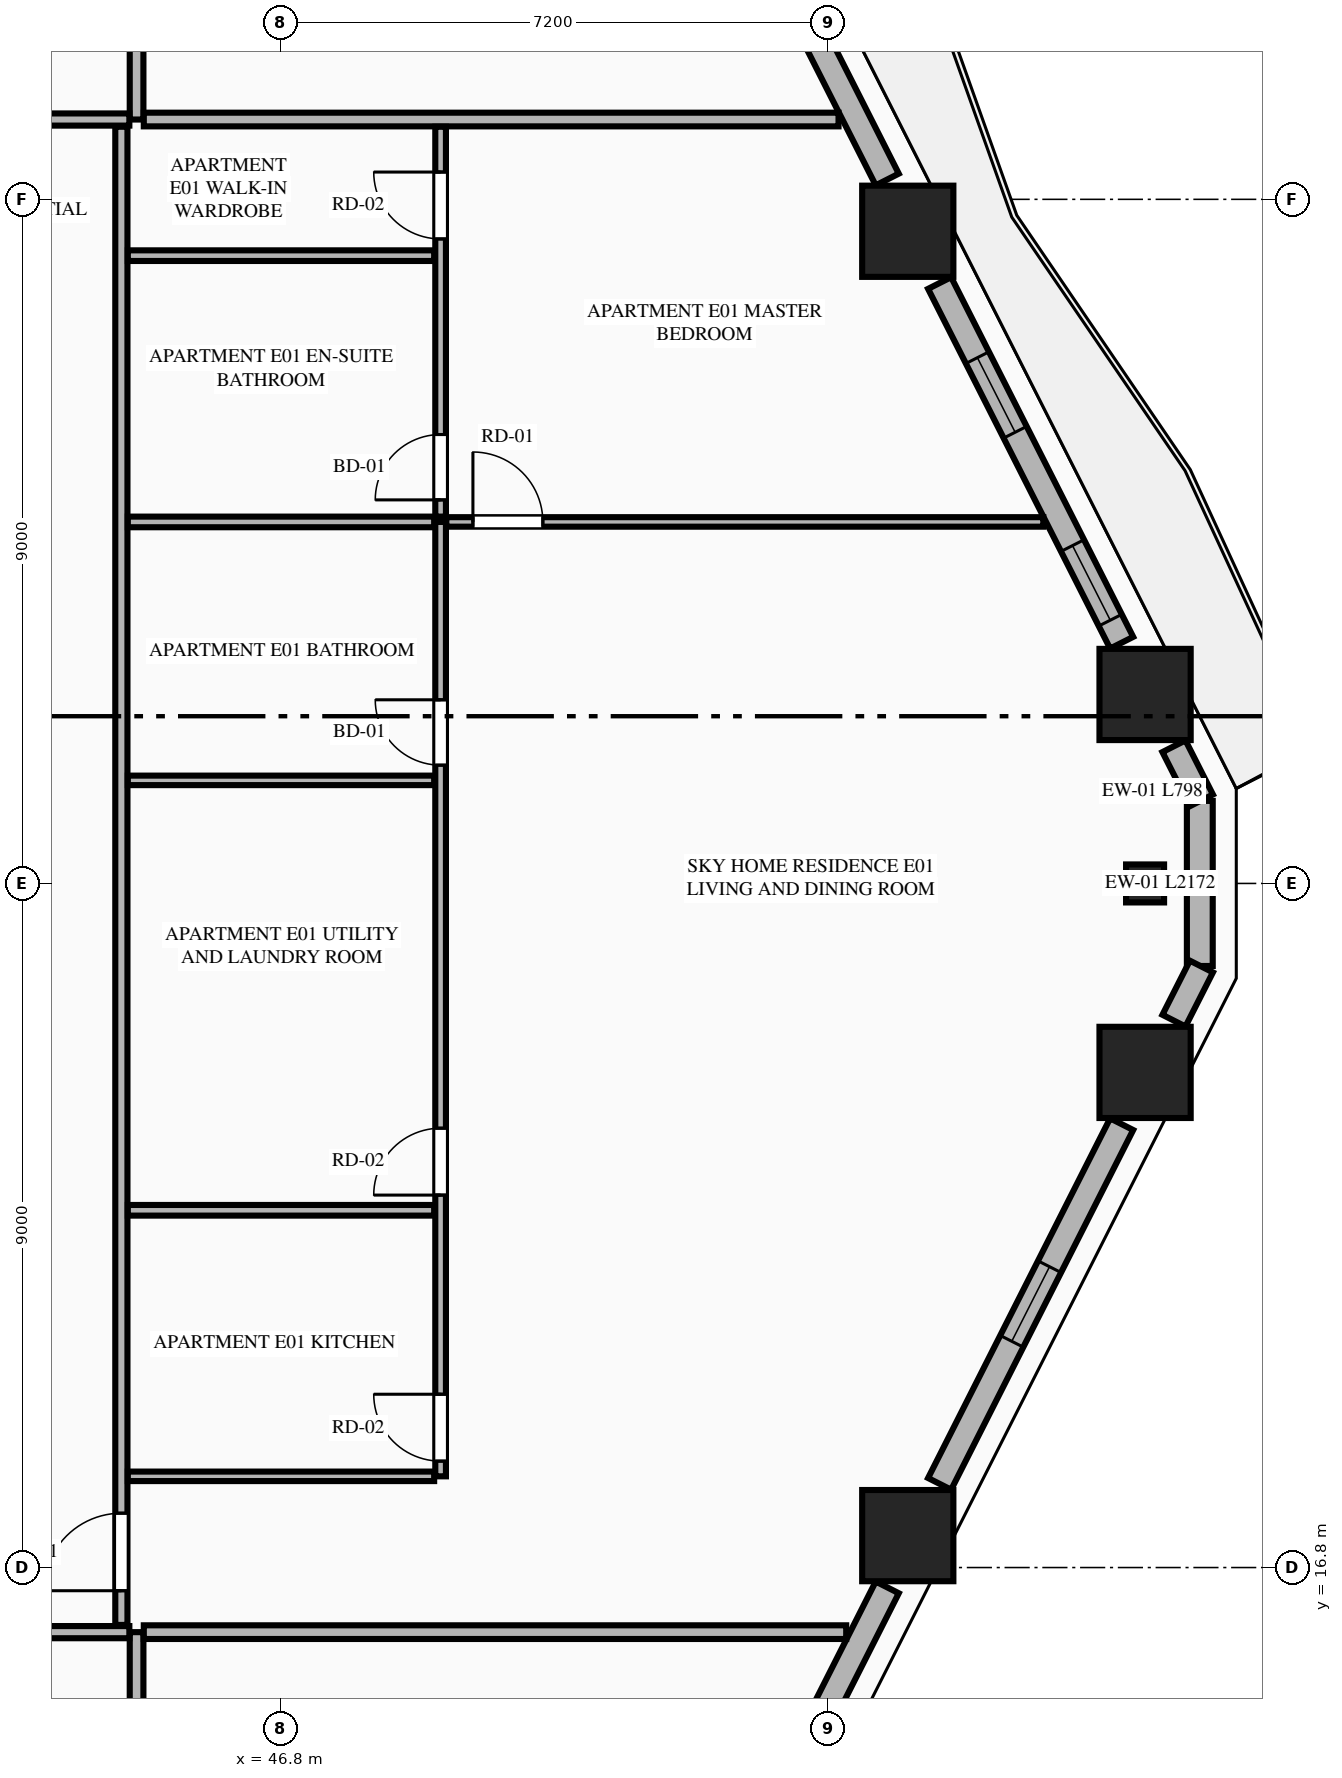
"""IFC4 building model, lengths in metres.
Left out: names, types, materials, properties, quantities, classifications, styles, units other than length and angle.
Written with IfcOpenShell. Run it as: python <this file> out.ifc"""

import sys

from ifc_helpers import new_model, si_unit, direction, frame, frame_2d, origin, origin_2d, place, context, subcontext, project, spatial, rectangle, extrude, element, fill, save


model = new_model("IFC4")
c1 = context("Model", 3, precision=1e-05, world=origin(), true_north=direction((0.0, 1.0)))
c2 = subcontext(c1, "Body", "Model", "MODEL_VIEW")
j1 = project(units=[si_unit("LENGTHUNIT", "METRE"), si_unit("PLANEANGLEUNIT", "RADIAN")], contexts=[c1])
p1 = place(None, origin())
s1 = spatial("IfcSite", under=j1, at=p1, CompositionType="ELEMENT")
p2 = place(p1, origin())
s2 = spatial("IfcBuilding", under=s1, at=p2, CompositionType="ELEMENT")
p3 = place(p2, frame((0.0, 0.0, 63.95)))
s3 = spatial("IfcBuildingStorey", under=s2, at=p3, CompositionType="ELEMENT", Elevation=63.95)
for number, where, z_axis, x_axis in (
    (1, (55.046, 17.22, 0.0), (0.0, 0.0, 1.0), (1.0, 0.0, 0.0)),
    (2, (58.168, 23.314, 0.0), (0.0, 0.0, 1.0), (1.0, 0.0, 0.0)),
    (3, (58.168, 28.286, 0.0), (0.0, 0.0, 1.0), (1.0, 0.0, 0.0)),
    (4, (55.046, 34.38, 0.0), (0.0, 0.0, 1.0), (1.0, 0.0, 0.0)),
):
    element("IfcColumn", number, at=place(p3, frame(where, z_axis=z_axis, x_axis=x_axis)), inside=s3, PredefinedType="COLUMN", context=c2, shape_type="SweptSolid", body=[
        extrude(rectangle(XDim=1.2, YDim=1.2, at=origin_2d()), origin(), (0.0, 0.0, 1.0), 3.55),
    ])
p4 = place(p3, frame((58.168, 25.8, 0.0), z_axis=(0.0, 0.0, 1.0), x_axis=(0.0, 1.0, 0.0)))
e5 = element("IfcColumn", 5, at=p4, inside=s3, PredefinedType="PILASTER", context=c2, shape_type="SweptSolid", body=[
    extrude(rectangle(XDim=0.5, YDim=0.35, at=origin_2d()), origin(), (0.0, 0.0, 1.0), 3.55),
])
p5 = place(p3, frame((58.888, 24.714, 0.0), z_axis=(0.0, 0.0, 1.0), x_axis=(0.0, 1.0, 0.0)))
e6 = element("IfcWall", 6, at=p5, inside=s3, PredefinedType="STANDARD", context=c2, shape_type="SweptSolid", body=[
    extrude(rectangle(XDim=2.172, YDim=0.34, at=frame_2d((1.086, 0.0))), origin(), (0.0, 0.0, 1.0), 3.33),
])
p6 = place(p3, frame((52.271, 11.59, 0.0), z_axis=(0.0, 0.0, 1.0), x_axis=(0.451592100298, 0.892224509273, 0.0)))
e7 = element("IfcWall", 7, at=p6, inside=s3, PredefinedType="STANDARD", context=c2, shape_type="SweptSolid", body=[
    extrude(rectangle(XDim=5.547, YDim=0.34, at=frame_2d((2.773, 0.0))), origin(), (0.0, 0.0, 1.0), 2.787),
])
p7 = place(p6, frame((2.223, 0.0, 0.75)))
e8 = element("IfcOpeningElement", 8, at=p7, cuts=e7, PredefinedType="OPENING", context=c2, shape_type="SweptSolid", body=[
    extrude(rectangle(XDim=1.1, YDim=1.887, at=frame_2d((0.55, 0.943))), frame((0.0, 0.18, 0.0), z_axis=(0.0, -1.0, 0.0), x_axis=(1.0, 0.0, 0.0)), (0.0, 0.0, 1.0), 0.36),
])
p8 = place(p3, frame((55.465, 17.901, 0.0), z_axis=(0.0, 0.0, 1.0), x_axis=(0.451572088722, 0.892234637686, 0.0)))
e9 = element("IfcWall", 9, at=p8, inside=s3, PredefinedType="STANDARD", context=c2, shape_type="SweptSolid", body=[
    extrude(rectangle(XDim=5.304, YDim=0.34, at=frame_2d((2.652, 0.0))), origin(), (0.0, 0.0, 1.0), 2.787),
])
p9 = place(p8, frame((2.102, 0.0, 0.75)))
e10 = element("IfcOpeningElement", 10, at=p9, cuts=e9, PredefinedType="OPENING", context=c2, shape_type="SweptSolid", body=[
    extrude(rectangle(XDim=1.1, YDim=1.887, at=frame_2d((0.55, 0.943))), frame((0.0, 0.18, 0.0), z_axis=(0.0, -1.0, 0.0), x_axis=(1.0, 0.0, 0.0)), (0.0, 0.0, 1.0), 0.36),
])
for number, where, z_axis, x_axis in (
    (11, (58.548, 23.995, 0.0), (0.0, 0.0, 1.0), (0.452, 0.892, 0.0)),
    (12, (58.909, 26.893, 0.0), (0.0, 0.0, 1.0), (-0.452, 0.892, 0.0)),
):
    element("IfcWall", number, at=place(p3, frame(where, z_axis=z_axis, x_axis=x_axis)), inside=s3, PredefinedType="STANDARD", context=c2, shape_type="SweptSolid", body=[
        extrude(rectangle(XDim=0.798, YDim=0.34, at=frame_2d((0.399, 0.0))), origin(), (0.0, 0.0, 1.0), 3.33),
    ])
p10 = place(p3, frame((57.86, 28.967, 0.0), z_axis=(0.0, 0.0, 1.0), x_axis=(-0.451590635984, 0.892225250422, 0.0)))
e13 = element("IfcWall", 13, at=p10, inside=s3, PredefinedType="STANDARD", context=c2, shape_type="SweptSolid", body=[
    extrude(rectangle(XDim=5.303, YDim=0.34, at=frame_2d((2.652, 0.0))), origin(), (0.0, 0.0, 1.0), 2.787),
])
p11 = place(p10, frame((0.332, 0.0, 0.75)))
e14 = element("IfcOpeningElement", 14, at=p11, cuts=e13, PredefinedType="OPENING", context=c2, shape_type="SweptSolid", body=[
    extrude(rectangle(XDim=1.1, YDim=1.887, at=frame_2d((0.55, 0.943))), frame((0.0, 0.18, 0.0), z_axis=(0.0, -1.0, 0.0), x_axis=(1.0, 0.0, 0.0)), (0.0, 0.0, 1.0), 0.36),
])
p12 = place(p10, frame((3.103, 0.0, 0.75)))
e15 = element("IfcOpeningElement", 15, at=p12, cuts=e13, PredefinedType="OPENING", context=c2, shape_type="SweptSolid", body=[
    extrude(rectangle(XDim=1.1, YDim=1.887, at=frame_2d((0.55, 0.943))), frame((0.0, 0.18, 0.0), z_axis=(0.0, -1.0, 0.0), x_axis=(1.0, 0.0, 0.0)), (0.0, 0.0, 1.0), 0.36),
])
p13 = place(p3, frame((54.776, 35.061, 0.0), z_axis=(0.0, 0.0, 1.0), x_axis=(-0.451592100298, 0.892224509273, 0.0)))
e16 = element("IfcWall", 16, at=p13, inside=s3, PredefinedType="STANDARD", context=c2, shape_type="SweptSolid", body=[
    extrude(rectangle(XDim=5.547, YDim=0.34, at=frame_2d((2.773, 0.0))), origin(), (0.0, 0.0, 1.0), 2.787),
])
p14 = place(p13, frame((2.791, 0.0, 0.0)))
e17 = element("IfcOpeningElement", 17, at=p14, cuts=e16, PredefinedType="OPENING", context=c2, shape_type="SweptSolid", body=[
    extrude(rectangle(XDim=1.1, YDim=2.25, at=frame_2d((0.55, 1.125))), frame((0.0, 0.18, 0.0), z_axis=(0.0, -1.0, 0.0), x_axis=(1.0, 0.0, 0.0)), (0.0, 0.0, 1.0), 0.36),
])
p15 = place(p3, frame((44.9, 2.455, 0.0), z_axis=(0.0, 0.0, 1.0), x_axis=(0.0, 1.0, 0.0)))
e18 = element("IfcWall", 18, at=p15, inside=s3, PredefinedType="PARTITIONING", context=c2, shape_type="SweptSolid", body=[
    extrude(rectangle(XDim=13.495, YDim=0.18, at=frame_2d((6.748, 0.0))), origin(), (0.0, 0.0, 1.0), 3.33),
])
p16 = place(p3, frame((36.617, 15.95, 0.0), z_axis=(0.0, 0.0, 1.0), x_axis=(1.0, 0.0, 0.0)))
e19 = element("IfcWall", 19, at=p16, inside=s3, PredefinedType="PARTITIONING", context=c2, shape_type="SweptSolid", body=[
    extrude(rectangle(XDim=8.188, YDim=0.16, at=frame_2d((4.094, 0.0))), origin(), (0.0, 0.0, 1.0), 3.33),
])
p17 = place(p16, frame((0.355, 0.0, 0.0)))
e20 = element("IfcOpeningElement", 20, at=p17, cuts=e19, PredefinedType="OPENING", context=c2, shape_type="SweptSolid", body=[
    extrude(rectangle(XDim=1.02, YDim=2.25, at=frame_2d((0.51, 1.125))), frame((0.0, 0.09, 0.0), z_axis=(0.0, -1.0, 0.0), x_axis=(1.0, 0.0, 0.0)), (0.0, 0.0, 1.0), 0.18),
])
p18 = place(p3, frame((44.9, 35.85, 0.0), z_axis=(0.0, 0.0, 1.0), x_axis=(0.0, 1.0, 0.0)))
e21 = element("IfcWall", 21, at=p18, inside=s3, PredefinedType="PARTITIONING", context=c2, shape_type="SweptSolid", body=[
    extrude(rectangle(XDim=13.295, YDim=0.18, at=frame_2d((6.647, 0.0))), origin(), (0.0, 0.0, 1.0), 3.33),
])
p19 = place(p3, frame((28.373, 35.85, 0.0), z_axis=(0.0, 0.0, 1.0), x_axis=(1.0, 0.0, 0.0)))
e22 = element("IfcWall", 22, at=p19, inside=s3, PredefinedType="PARTITIONING", context=c2, shape_type="SweptSolid", body=[
    extrude(rectangle(XDim=16.432, YDim=0.16, at=frame_2d((8.216, 0.0))), origin(), (0.0, 0.0, 1.0), 3.33),
])
p20 = place(p19, frame((0.355, 0.0, 0.0)))
e23 = element("IfcOpeningElement", 23, at=p20, cuts=e22, PredefinedType="OPENING", context=c2, shape_type="SweptSolid", body=[
    extrude(rectangle(XDim=1.35, YDim=2.35, at=frame_2d((0.675, 1.175))), frame((0.0, 0.09, 0.0), z_axis=(0.0, -1.0, 0.0), x_axis=(1.0, 0.0, 0.0)), (0.0, 0.0, 1.0), 0.18),
])
p21 = place(p3, frame((44.995, 15.95, 0.0), z_axis=(0.0, 0.0, 1.0), x_axis=(1.0, 0.0, 0.0)))
e24 = element("IfcWall", 24, at=p21, inside=s3, PredefinedType="PARTITIONING", context=c2, shape_type="SweptSolid", body=[
    extrude(rectangle(XDim=9.241, YDim=0.18, at=frame_2d((4.621, 0.0))), origin(), (0.0, 0.0, 1.0), 3.33),
])
p22 = place(p3, frame((44.995, 35.85, 0.0), z_axis=(0.0, 0.0, 1.0), x_axis=(1.0, 0.0, 0.0)))
e25 = element("IfcWall", 25, at=p22, inside=s3, PredefinedType="PARTITIONING", context=c2, shape_type="SweptSolid", body=[
    extrude(rectangle(XDim=9.14, YDim=0.18, at=frame_2d((4.57, 0.0))), origin(), (0.0, 0.0, 1.0), 3.33),
])
p23 = place(p3, frame((44.7, 16.045, 0.0), z_axis=(0.0, 0.0, 1.0), x_axis=(0.0, 1.0, 0.0)))
e26 = element("IfcWall", 26, at=p23, inside=s3, PredefinedType="PARTITIONING", context=c2, shape_type="SweptSolid", body=[
    extrude(rectangle(XDim=19.71, YDim=0.16, at=frame_2d((9.855, 0.0))), origin(), (0.0, 0.0, 1.0), 2.7),
])
p24 = place(p23, frame((0.45, 0.0, 0.0)))
e27 = element("IfcOpeningElement", 27, at=p24, cuts=e26, PredefinedType="OPENING", context=c2, shape_type="SweptSolid", body=[
    extrude(rectangle(XDim=1.02, YDim=2.25, at=frame_2d((0.51, 1.125))), frame((0.0, 0.09, 0.0), z_axis=(0.0, -1.0, 0.0), x_axis=(1.0, 0.0, 0.0)), (0.0, 0.0, 1.0), 0.18),
])
p25 = place(p3, frame((44.785, 18.0, 0.0), z_axis=(0.0, 0.0, 1.0), x_axis=(1.0, 0.0, 0.0)))
e28 = element("IfcWall", 28, at=p25, inside=s3, PredefinedType="PARTITIONING", context=c2, shape_type="SweptSolid", body=[
    extrude(rectangle(XDim=4.03, YDim=0.125, at=frame_2d((2.015, 0.0))), origin(), (0.0, 0.0, 1.0), 2.7),
])
p26 = place(p3, frame((48.9, 18.0, 0.0), z_axis=(0.0, 0.0, 1.0), x_axis=(0.0, 1.0, 0.0)))
e29 = element("IfcWall", 29, at=p26, inside=s3, PredefinedType="PLUMBINGWALL", context=c2, shape_type="SweptSolid", body=[
    extrude(rectangle(XDim=12.556, YDim=0.14, at=frame_2d((6.278, 0.0))), origin(), (0.0, 0.0, 1.0), 3.33),
])
p27 = place(p26, frame((0.2, 0.0, 0.0)))
e30 = element("IfcOpeningElement", 30, at=p27, cuts=e29, PredefinedType="OPENING", context=c2, shape_type="SweptSolid", body=[
    extrude(rectangle(XDim=0.88, YDim=2.15, at=frame_2d((0.44, 1.075))), frame((0.0, 0.08, 0.0), z_axis=(0.0, -1.0, 0.0), x_axis=(1.0, 0.0, 0.0)), (0.0, 0.0, 1.0), 0.16),
])
p28 = place(p26, frame((3.7, 0.0, 0.0)))
e31 = element("IfcOpeningElement", 31, at=p28, cuts=e29, PredefinedType="OPENING", context=c2, shape_type="SweptSolid", body=[
    extrude(rectangle(XDim=0.88, YDim=2.15, at=frame_2d((0.44, 1.075))), frame((0.0, 0.08, 0.0), z_axis=(0.0, -1.0, 0.0), x_axis=(1.0, 0.0, 0.0)), (0.0, 0.0, 1.0), 0.16),
])
p29 = place(p26, frame((9.356, 0.0, 0.0)))
e32 = element("IfcOpeningElement", 32, at=p29, cuts=e29, PredefinedType="OPENING", context=c2, shape_type="SweptSolid", body=[
    extrude(rectangle(XDim=0.86, YDim=2.1, at=frame_2d((0.43, 1.05))), frame((0.0, 0.08, 0.0), z_axis=(0.0, -1.0, 0.0), x_axis=(1.0, 0.0, 0.0)), (0.0, 0.0, 1.0), 0.16),
])
p30 = place(p3, frame((48.9, 30.626, 0.0), z_axis=(0.0, 0.0, 1.0), x_axis=(0.0, 1.0, 0.0)))
e33 = element("IfcWall", 33, at=p30, inside=s3, PredefinedType="PLUMBINGWALL", context=c2, shape_type="SweptSolid", body=[
    extrude(rectangle(XDim=5.129, YDim=0.14, at=frame_2d((2.564, 0.0))), origin(), (0.0, 0.0, 1.0), 3.33),
])
p31 = place(p30, frame((0.22, 0.0, 0.0)))
e34 = element("IfcOpeningElement", 34, at=p31, cuts=e33, PredefinedType="OPENING", context=c2, shape_type="SweptSolid", body=[
    extrude(rectangle(XDim=0.86, YDim=2.1, at=frame_2d((0.43, 1.05))), frame((0.0, 0.08, 0.0), z_axis=(0.0, -1.0, 0.0), x_axis=(1.0, 0.0, 0.0)), (0.0, 0.0, 1.0), 0.16),
])
p32 = place(p30, frame((3.653, 0.0, 0.0)))
e35 = element("IfcOpeningElement", 35, at=p32, cuts=e33, PredefinedType="OPENING", context=c2, shape_type="SweptSolid", body=[
    extrude(rectangle(XDim=0.88, YDim=2.15, at=frame_2d((0.44, 1.075))), frame((0.0, 0.08, 0.0), z_axis=(0.0, -1.0, 0.0), x_axis=(1.0, 0.0, 0.0)), (0.0, 0.0, 1.0), 0.16),
])
p33 = place(p3, frame((44.785, 30.556, 0.0), z_axis=(0.0, 0.0, 1.0), x_axis=(1.0, 0.0, 0.0)))
e36 = element("IfcWall", 36, at=p33, inside=s3, PredefinedType="PLUMBINGWALL", context=c2, shape_type="SweptSolid", body=[
    extrude(rectangle(XDim=4.03, YDim=0.14, at=frame_2d((2.015, 0.0))), origin(), (0.0, 0.0, 1.0), 3.33),
])
p34 = place(p3, frame((48.975, 30.556, 0.0), z_axis=(0.0, 0.0, 1.0), x_axis=(1.0, 0.0, 0.0)))
e37 = element("IfcWall", 37, at=p34, inside=s3, PredefinedType="PARTITIONING", context=c2, shape_type="SweptSolid", body=[
    extrude(rectangle(XDim=7.854, YDim=0.125, at=frame_2d((3.927, 0.0))), origin(), (0.0, 0.0, 1.0), 3.33),
])
p35 = place(p34, frame((0.35, 0.0, 0.0)))
e38 = element("IfcOpeningElement", 38, at=p35, cuts=e37, PredefinedType="OPENING", context=c2, shape_type="SweptSolid", body=[
    extrude(rectangle(XDim=0.92, YDim=2.15, at=frame_2d((0.46, 1.075))), frame((0.0, 0.073, 0.0), z_axis=(0.0, -1.0, 0.0), x_axis=(1.0, 0.0, 0.0)), (0.0, 0.0, 1.0), 0.145),
])
p36 = place(p3, frame((44.785, 21.5, 0.0), z_axis=(0.0, 0.0, 1.0), x_axis=(1.0, 0.0, 0.0)))
e39 = element("IfcWall", 39, at=p36, inside=s3, PredefinedType="PLUMBINGWALL", context=c2, shape_type="SweptSolid", body=[
    extrude(rectangle(XDim=4.03, YDim=0.14, at=frame_2d((2.015, 0.0))), origin(), (0.0, 0.0, 1.0), 3.33),
])
p37 = place(p3, frame((44.785, 27.156, 0.0), z_axis=(0.0, 0.0, 1.0), x_axis=(1.0, 0.0, 0.0)))
e40 = element("IfcWall", 40, at=p37, inside=s3, PredefinedType="PARTITIONING", context=c2, shape_type="SweptSolid", body=[
    extrude(rectangle(XDim=4.03, YDim=0.125, at=frame_2d((2.015, 0.0))), origin(), (0.0, 0.0, 1.0), 3.33),
])
p38 = place(p3, frame((44.785, 34.059, 0.0), z_axis=(0.0, 0.0, 1.0), x_axis=(1.0, 0.0, 0.0)))
e41 = element("IfcWall", 41, at=p38, inside=s3, PredefinedType="PLUMBINGWALL", context=c2, shape_type="SweptSolid", body=[
    extrude(rectangle(XDim=4.03, YDim=0.14, at=frame_2d((2.015, 0.0))), origin(), (0.0, 0.0, 1.0), 2.7),
])
p39 = place(p9, origin())
e42 = element("IfcWindow", 42, at=p39, inside=s3, PartitioningType="SINGLE_PANEL", PredefinedType="WINDOW", context=c2, shape_type="SweptSolid", body=[
    extrude(rectangle(XDim=1.1, YDim=1.887, at=frame_2d((0.55, 0.943))), frame((0.0, 0.03, 0.0), z_axis=(0.0, -1.0, 0.0), x_axis=(1.0, 0.0, 0.0)), (0.0, 0.0, 1.0), 0.06),
])
fill(e10, e42)
p40 = place(p11, origin())
e43 = element("IfcWindow", 43, at=p40, inside=s3, PartitioningType="SINGLE_PANEL", PredefinedType="WINDOW", context=c2, shape_type="SweptSolid", body=[
    extrude(rectangle(XDim=1.1, YDim=1.887, at=frame_2d((0.55, 0.943))), frame((0.0, 0.03, 0.0), z_axis=(0.0, -1.0, 0.0), x_axis=(1.0, 0.0, 0.0)), (0.0, 0.0, 1.0), 0.06),
])
fill(e14, e43)
p41 = place(p27, origin())
e44 = element("IfcDoor", 44, at=p41, inside=s3, OperationType="SINGLE_SWING_RIGHT", PredefinedType="DOOR", context=c2, shape_type="SweptSolid", body=[
    extrude(rectangle(XDim=0.88, YDim=2.15, at=frame_2d((0.44, 1.075))), frame((0.0, 0.025, 0.0), z_axis=(0.0, -1.0, 0.0), x_axis=(1.0, 0.0, 0.0)), (0.0, 0.0, 1.0), 0.05),
])
fill(e30, e44)
p42 = place(p28, origin())
e45 = element("IfcDoor", 45, at=p42, inside=s3, OperationType="SINGLE_SWING_LEFT", PredefinedType="DOOR", context=c2, shape_type="SweptSolid", body=[
    extrude(rectangle(XDim=0.88, YDim=2.15, at=frame_2d((0.44, 1.075))), frame((0.0, 0.025, 0.0), z_axis=(0.0, -1.0, 0.0), x_axis=(1.0, 0.0, 0.0)), (0.0, 0.0, 1.0), 0.05),
])
fill(e31, e45)
p43 = place(p29, origin())
e46 = element("IfcDoor", 46, at=p43, inside=s3, OperationType="SINGLE_SWING_RIGHT", PredefinedType="DOOR", context=c2, shape_type="SweptSolid", body=[
    extrude(rectangle(XDim=0.86, YDim=2.1, at=frame_2d((0.43, 1.05))), frame((0.0, 0.025, 0.0), z_axis=(0.0, -1.0, 0.0), x_axis=(1.0, 0.0, 0.0)), (0.0, 0.0, 1.0), 0.05),
])
fill(e32, e46)
p44 = place(p31, origin())
e47 = element("IfcDoor", 47, at=p44, inside=s3, OperationType="SINGLE_SWING_LEFT", PredefinedType="DOOR", context=c2, shape_type="SweptSolid", body=[
    extrude(rectangle(XDim=0.86, YDim=2.1, at=frame_2d((0.43, 1.05))), frame((0.0, 0.025, 0.0), z_axis=(0.0, -1.0, 0.0), x_axis=(1.0, 0.0, 0.0)), (0.0, 0.0, 1.0), 0.05),
])
fill(e34, e47)
p45 = place(p32, origin())
e48 = element("IfcDoor", 48, at=p45, inside=s3, OperationType="SINGLE_SWING_RIGHT", PredefinedType="DOOR", context=c2, shape_type="SweptSolid", body=[
    extrude(rectangle(XDim=0.88, YDim=2.15, at=frame_2d((0.44, 1.075))), frame((0.0, 0.025, 0.0), z_axis=(0.0, -1.0, 0.0), x_axis=(1.0, 0.0, 0.0)), (0.0, 0.0, 1.0), 0.05),
])
fill(e35, e48)
p46 = place(p24, origin())
e49 = element("IfcDoor", 49, at=p46, inside=s3, OperationType="SINGLE_SWING_LEFT", PredefinedType="DOOR", context=c2, shape_type="SweptSolid", body=[
    extrude(rectangle(XDim=1.02, YDim=2.25, at=frame_2d((0.51, 1.125))), frame((0.0, 0.025, 0.0), z_axis=(0.0, -1.0, 0.0), x_axis=(1.0, 0.0, 0.0)), (0.0, 0.0, 1.0), 0.05),
])
fill(e27, e49)
p47 = place(p35, origin())
e50 = element("IfcDoor", 50, at=p47, inside=s3, OperationType="SINGLE_SWING_LEFT", PredefinedType="DOOR", context=c2, shape_type="SweptSolid", body=[
    extrude(rectangle(XDim=0.92, YDim=2.15, at=frame_2d((0.46, 1.075))), frame((0.0, 0.025, 0.0), z_axis=(0.0, -1.0, 0.0), x_axis=(1.0, 0.0, 0.0)), (0.0, 0.0, 1.0), 0.05),
])
fill(e38, e50)
p48 = place(p12, origin())
e51 = element("IfcWindow", 51, at=p48, inside=s3, PartitioningType="SINGLE_PANEL", PredefinedType="WINDOW", context=c2, shape_type="SweptSolid", body=[
    extrude(rectangle(XDim=1.1, YDim=1.887, at=frame_2d((0.55, 0.943))), frame((0.0, 0.03, 0.0), z_axis=(0.0, -1.0, 0.0), x_axis=(1.0, 0.0, 0.0)), (0.0, 0.0, 1.0), 0.06),
])
fill(e15, e51)
save(model, sys.argv[1])
